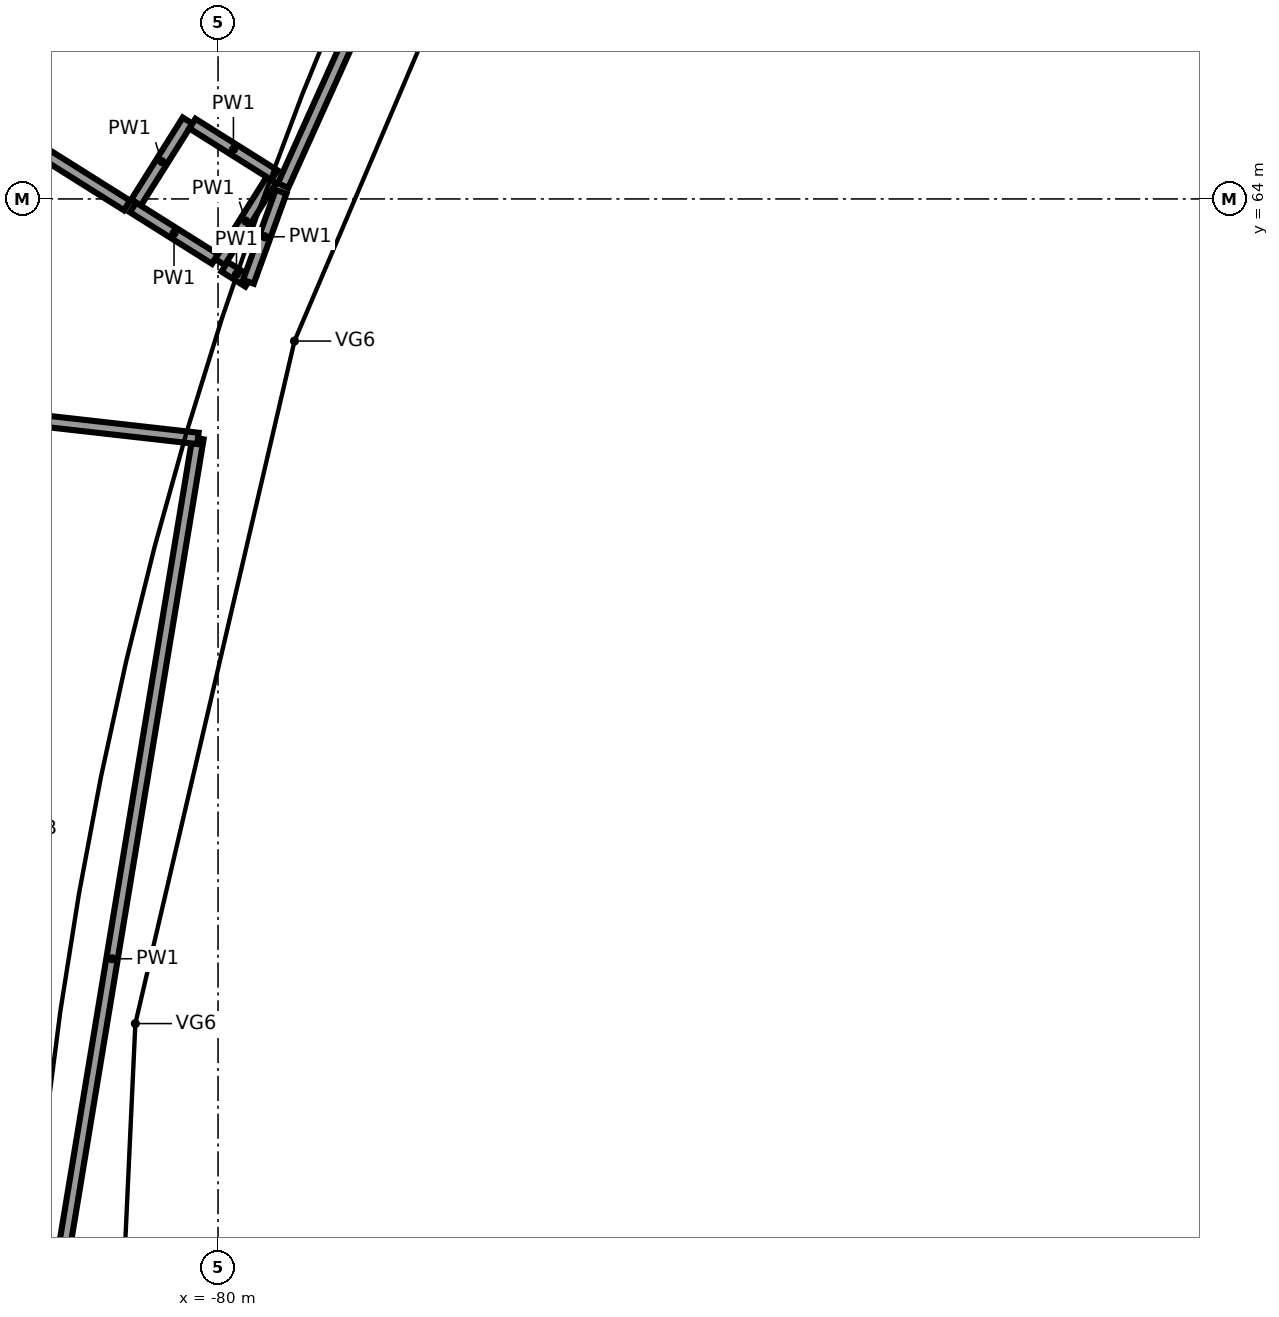
"""IFC4 building model, lengths in metres.
Left out: names, types, materials, properties, quantities, classifications, styles, units other than length and angle.
Written with IfcOpenShell. Run it as: python <this file> out.ifc"""

import sys

from ifc_helpers import new_model, si_unit, direction, frame, frame_2d, origin, origin_2d, place, context, subcontext, project, spatial, rectangle, circle, extrude, element, save


model = new_model("IFC4")
c1 = context("Model", 3, precision=1e-05, world=origin(), true_north=direction((0.0, 1.0)))
c2 = subcontext(c1, "Body", "Model", "MODEL_VIEW")
j1 = project(units=[si_unit("LENGTHUNIT", "METRE"), si_unit("PLANEANGLEUNIT", "RADIAN")], contexts=[c1])
p1 = place(None, origin())
s1 = spatial("IfcSite", under=j1, at=p1, CompositionType="ELEMENT")
p2 = place(p1, origin())
s2 = spatial("IfcBuilding", under=s1, at=p2, CompositionType="ELEMENT")
p3 = place(p2, frame((0.0, 0.0, 24.0)))
s3 = spatial("IfcBuildingStorey", under=s2, at=p3, CompositionType="ELEMENT", Elevation=24.0)
p4 = place(p3, frame((-82.169, 63.034, 0.0), z_axis=(0.0, 0.0, 1.0), x_axis=(1.0, 0.0, 0.0)))
e1 = element("IfcColumn", 1, at=p4, inside=s3, PredefinedType="COLUMN", context=c2, shape_type="SweptSolid", body=[
    extrude(circle(Radius=0.5, at=origin_2d()), origin(), (0.0, 0.0, 1.0), 6.0),
])
for number, where, z_axis, x_axis in (
    (2, (-80.401, 65.031, 0.0), (0.0, 0.0, 1.0), (-0.532, -0.847, 0.0)),
    (3, (-81.119, 63.888, 0.0), (0.0, 0.0, 1.0), (0.847, -0.532, 0.0)),
):
    element("IfcWall", number, at=place(p3, frame(where, z_axis=z_axis, x_axis=x_axis)), inside=s3, PredefinedType="PARTITIONING", context=c2, shape_type="SweptSolid", body=[
        extrude(rectangle(XDim=1.275, YDim=0.15, at=frame_2d((0.638, 0.0))), origin(), (0.0, 0.0, 1.0), 5.4),
    ])
for number, where, z_axis, x_axis in (
    (4, (-79.976, 63.17, 0.0), (0.0, 0.0, 1.0), (0.532, 0.847, 0.0)),
    (5, (-79.258, 64.313, 0.0), (0.0, 0.0, 1.0), (-0.847, 0.532, 0.0)),
):
    element("IfcWall", number, at=place(p3, frame(where, z_axis=z_axis, x_axis=x_axis)), inside=s3, PredefinedType="PARTITIONING", context=c2, shape_type="SweptSolid", body=[
        extrude(rectangle(XDim=1.275, YDim=0.15, at=frame_2d((0.637, 0.0))), origin(), (0.0, 0.0, 1.0), 5.4),
    ])
p5 = place(p3, frame((-85.011, 66.31, 0.0), z_axis=(0.0, 0.0, 1.0), x_axis=(0.846686094665, -0.532092714761, 0.0)))
e6 = element("IfcWall", 6, at=p5, inside=s3, PredefinedType="PARTITIONING", context=c2, shape_type="SweptSolid", body=[
    extrude(rectangle(XDim=4.503, YDim=0.15, at=frame_2d((2.252, 0.0))), origin(), (0.0, 0.0, 1.0), 5.4),
])
p6 = place(p5, frame((0.65, 0.0, 0.0)))
e7 = element("IfcOpeningElement", 7, at=p6, cuts=e6, PredefinedType="OPENING", context=c2, shape_type="SweptSolid", body=[
    extrude(rectangle(XDim=1.8, YDim=2.1, at=frame_2d((0.9, 1.05))), frame((0.0, 0.085, 0.0), z_axis=(0.0, -1.0, 0.0), x_axis=(1.0, 0.0, 0.0)), (0.0, 0.0, 1.0), 0.17),
])
p7 = place(p3, frame((-79.915, 63.108, 0.0), z_axis=(0.0, 0.0, 1.0), x_axis=(0.846738245251, -0.532009721744, 0.0)))
e8 = element("IfcWall", 8, at=p7, inside=s3, PredefinedType="PARTITIONING", context=c2, shape_type="SweptSolid", body=[
    extrude(rectangle(XDim=0.371, YDim=0.15, at=frame_2d((0.186, 0.0))), origin(), (0.0, 0.0, 1.0), 5.4),
])
p8 = place(p3, frame((-79.601, 62.91, 0.0), z_axis=(0.0, 0.0, 1.0), x_axis=(0.341400782583, 0.939917818563, 0.0)))
e9 = element("IfcWall", 9, at=p8, inside=s3, PredefinedType="PARTITIONING", context=c2, shape_type="SweptSolid", body=[
    extrude(rectangle(XDim=1.26, YDim=0.15, at=frame_2d((0.63, 0.0))), origin(), (0.0, 0.0, 1.0), 5.4),
])
p9 = place(p3, frame((-79.145, 64.175, 0.0), z_axis=(0.0, 0.0, 1.0), x_axis=(0.411198704288, 0.911545734229, 0.0)))
e10 = element("IfcWall", 10, at=p9, inside=s3, PredefinedType="PARTITIONING", context=c2, shape_type="SweptSolid", body=[
    extrude(rectangle(XDim=7.435, YDim=0.15, at=frame_2d((3.718, 0.0))), origin(), (0.0, 0.0, 1.0), 5.4),
])
p10 = place(p3, frame((-82.525, 47.158, 0.0), z_axis=(0.0, 0.0, 1.0), x_axis=(0.162926716645, 0.986638173295, 0.0)))
e11 = element("IfcWall", 11, at=p10, inside=s3, PredefinedType="PARTITIONING", context=c2, shape_type="SweptSolid", body=[
    extrude(rectangle(XDim=13.877, YDim=0.15, at=frame_2d((6.939, 0.0))), origin(), (0.0, 0.0, 1.0), 5.4),
])
p11 = place(p3, frame((-80.264, 60.85, 0.0), z_axis=(0.0, 0.0, 1.0), x_axis=(-0.993711169243, 0.111973711744, 0.0)))
e12 = element("IfcWall", 12, at=p11, inside=s3, PredefinedType="PARTITIONING", context=c2, shape_type="SweptSolid", body=[
    extrude(rectangle(XDim=6.046, YDim=0.15, at=frame_2d((3.023, 0.0))), origin(), (0.0, 0.0, 1.0), 5.4),
])
p12 = place(p11, frame((2.15, 0.0, 0.0)))
e13 = element("IfcOpeningElement", 13, at=p12, cuts=e12, PredefinedType="OPENING", context=c2, shape_type="SweptSolid", body=[
    extrude(rectangle(XDim=1.8, YDim=2.1, at=frame_2d((0.9, 1.05))), frame((0.0, 0.085, 0.0), z_axis=(0.0, -1.0, 0.0), x_axis=(1.0, 0.0, 0.0)), (0.0, 0.0, 1.0), 0.17),
])
save(model, sys.argv[1])
